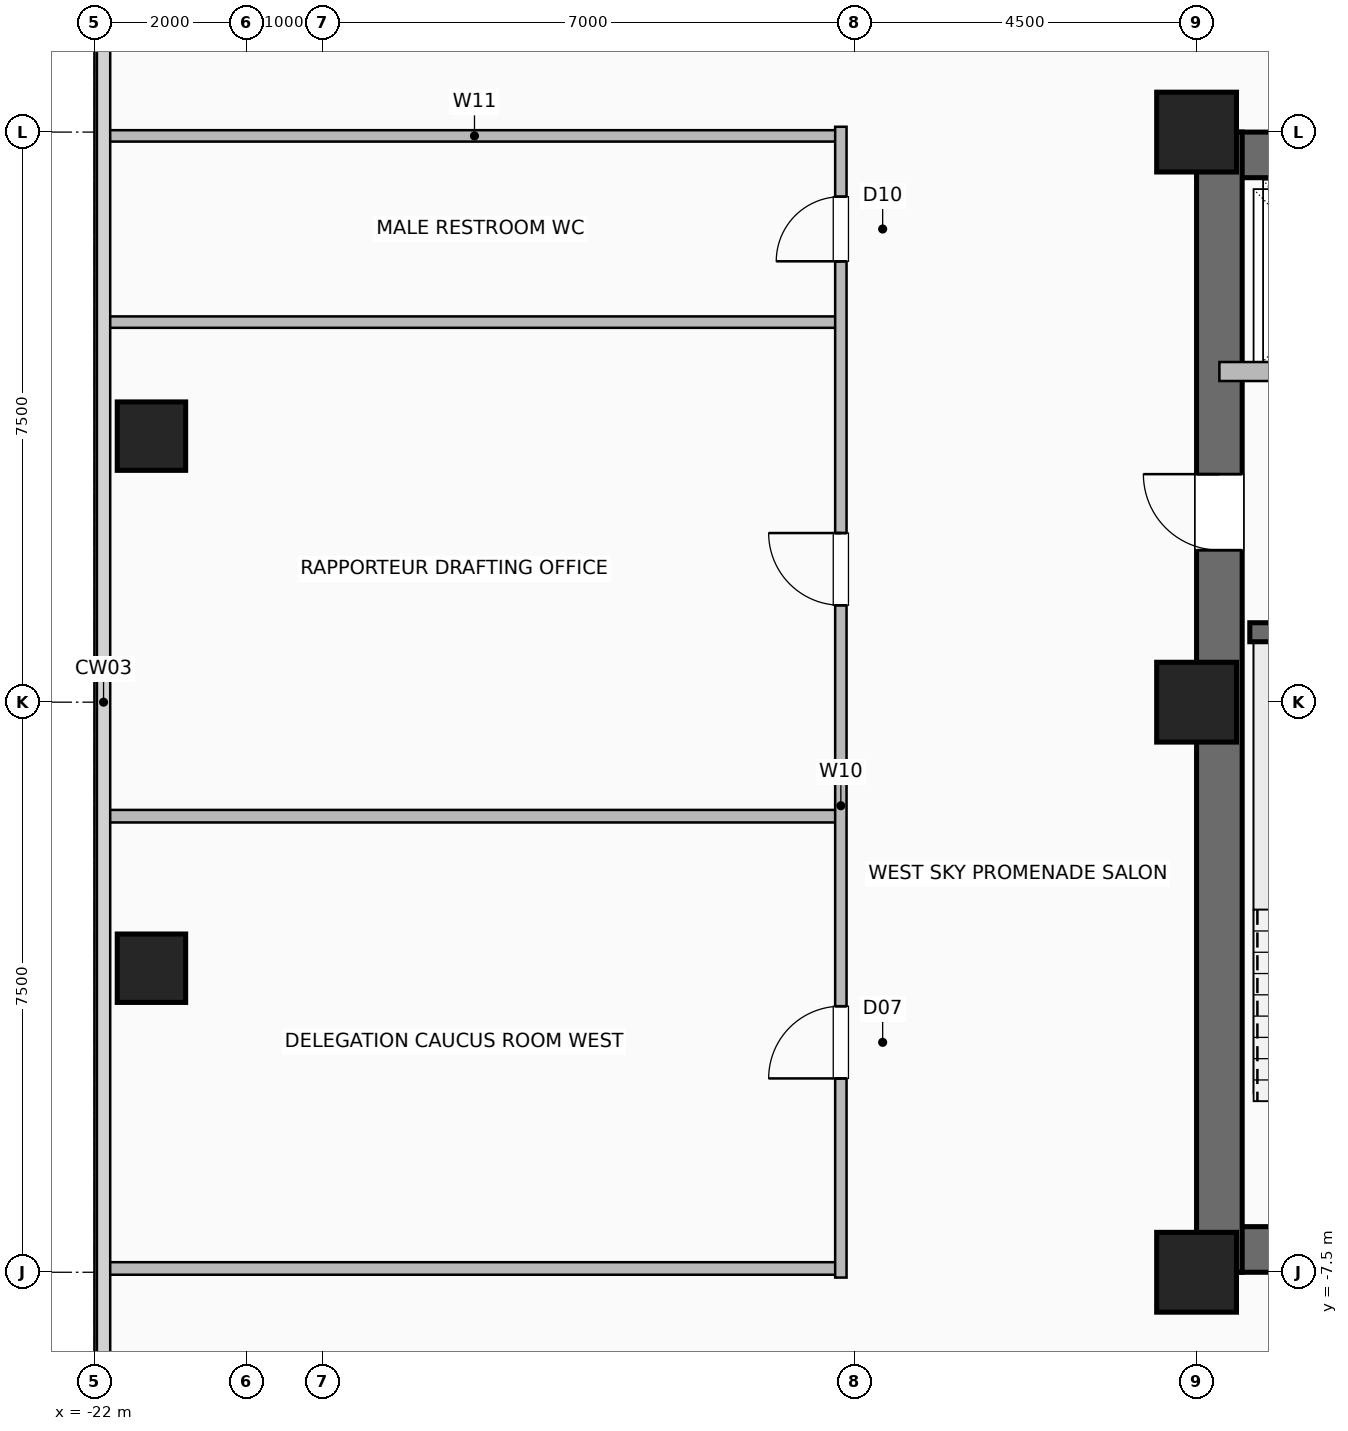
"""IFC4 building model, lengths in metres.
Left out: names, types, materials, properties, quantities, classifications, styles, units other than length and angle.
Written with IfcOpenShell. Run it as: python <this file> out.ifc"""

import sys

from ifc_helpers import new_model, si_unit, direction, frame, frame_2d, origin, origin_2d, place, context, subcontext, project, spatial, rectangle, hollow_rectangle, extrude, element, fill, save


model = new_model("IFC4")
c1 = context("Model", 3, precision=1e-05, world=origin(), true_north=direction((0.0, 1.0)))
c2 = subcontext(c1, "Body", "Model", "MODEL_VIEW")
j1 = project(units=[si_unit("LENGTHUNIT", "METRE"), si_unit("PLANEANGLEUNIT", "RADIAN")], contexts=[c1])
p1 = place(None, origin())
s1 = spatial("IfcSite", under=j1, at=p1, CompositionType="ELEMENT")
p2 = place(p1, origin())
s2 = spatial("IfcBuilding", under=s1, at=p2, CompositionType="ELEMENT")
p3 = place(p2, frame((0.0, 0.0, 101.2)))
s3 = spatial("IfcBuildingStorey", under=s2, at=p3, CompositionType="ELEMENT", Elevation=101.2)
for number, where, z_axis, x_axis in (
    (1, (-7.5, -7.5, 0.0), (0.0, 0.0, 1.0), (1.0, 0.0, 0.0)),
    (2, (-7.5, 7.5, 0.0), (0.0, 0.0, 1.0), (1.0, 0.0, 0.0)),
    (3, (-7.5, 0.0, 0.0), (0.0, 0.0, 1.0), (1.0, 0.0, 0.0)),
):
    element("IfcColumn", number, at=place(p3, frame(where, z_axis=z_axis, x_axis=x_axis)), inside=s3, PredefinedType="COLUMN", context=c2, shape_type="SweptSolid", body=[
        extrude(hollow_rectangle(XDim=1.05, YDim=1.05, WallThickness=0.05, at=origin_2d()), origin(), (0.0, 0.0, 1.0), 3.6),
    ])
for number, where, z_axis, x_axis in (
    (4, (-21.25, -3.5, 0.0), (0.0, 0.0, 1.0), (1.0, 0.0, 0.0)),
    (5, (-21.25, 3.5, 0.0), (0.0, 0.0, 1.0), (1.0, 0.0, 0.0)),
):
    element("IfcColumn", number, at=place(p3, frame(where, z_axis=z_axis, x_axis=x_axis)), inside=s3, PredefinedType="COLUMN", context=c2, shape_type="SweptSolid", body=[
        extrude(hollow_rectangle(XDim=0.9, YDim=0.9, WallThickness=0.045, at=origin_2d()), origin(), (0.0, 0.0, 1.0), 3.6),
    ])
p4 = place(p3, frame((-7.5, -7.2, 0.0), z_axis=(0.0, 0.0, 1.0), x_axis=(1.0, 0.0, 0.0)))
e6 = element("IfcWall", 6, at=p4, inside=s3, PredefinedType="SHEAR", context=c2, shape_type="SweptSolid", body=[
    extrude(rectangle(XDim=15.0, YDim=0.6, at=frame_2d((7.5, 0.0))), origin(), (0.0, 0.0, 1.0), 3.36),
])
p5 = place(p4, frame((1.55, 0.0, 0.0)))
e7 = element("IfcOpeningElement", 7, at=p5, cuts=e6, PredefinedType="OPENING", context=c2, shape_type="SweptSolid", body=[
    extrude(rectangle(XDim=1.05, YDim=2.08, at=frame_2d((0.525, 1.04))), frame((0.0, 0.31, 0.0), z_axis=(0.0, -1.0, 0.0), x_axis=(1.0, 0.0, 0.0)), (0.0, 0.0, 1.0), 0.62),
])
p6 = place(p4, frame((12.4, 0.0, 0.0)))
e8 = element("IfcOpeningElement", 8, at=p6, cuts=e6, PredefinedType="OPENING", context=c2, shape_type="SweptSolid", body=[
    extrude(rectangle(XDim=1.05, YDim=2.08, at=frame_2d((0.525, 1.04))), frame((0.0, 0.31, 0.0), z_axis=(0.0, -1.0, 0.0), x_axis=(1.0, 0.0, 0.0)), (0.0, 0.0, 1.0), 0.62),
])
p7 = place(p4, frame((4.95, 0.0, 0.0)))
e9 = element("IfcOpeningElement", 9, at=p7, cuts=e6, PredefinedType="OPENING", context=c2, shape_type="SweptSolid", body=[
    extrude(rectangle(XDim=1.0, YDim=2.08, at=frame_2d((0.5, 1.04))), frame((0.0, 0.31, 0.0), z_axis=(0.0, -1.0, 0.0), x_axis=(1.0, 0.0, 0.0)), (0.0, 0.0, 1.0), 0.62),
])
p8 = place(p4, frame((7.05, 0.0, 0.0)))
e10 = element("IfcOpeningElement", 10, at=p8, cuts=e6, PredefinedType="OPENING", context=c2, shape_type="SweptSolid", body=[
    extrude(rectangle(XDim=1.0, YDim=2.08, at=frame_2d((0.5, 1.04))), frame((0.0, 0.31, 0.0), z_axis=(0.0, -1.0, 0.0), x_axis=(1.0, 0.0, 0.0)), (0.0, 0.0, 1.0), 0.62),
])
p9 = place(p4, frame((9.15, 0.0, 0.0)))
e11 = element("IfcOpeningElement", 11, at=p9, cuts=e6, PredefinedType="OPENING", context=c2, shape_type="SweptSolid", body=[
    extrude(rectangle(XDim=1.0, YDim=2.08, at=frame_2d((0.5, 1.04))), frame((0.0, 0.31, 0.0), z_axis=(0.0, -1.0, 0.0), x_axis=(1.0, 0.0, 0.0)), (0.0, 0.0, 1.0), 0.62),
])
p10 = place(p3, frame((-7.5, 7.2, 0.0), z_axis=(0.0, 0.0, 1.0), x_axis=(1.0, 0.0, 0.0)))
e12 = element("IfcWall", 12, at=p10, inside=s3, PredefinedType="SHEAR", context=c2, shape_type="SweptSolid", body=[
    extrude(rectangle(XDim=15.0, YDim=0.6, at=frame_2d((7.5, 0.0))), origin(), (0.0, 0.0, 1.0), 3.36),
])
p11 = place(p3, frame((-7.2, -7.5, 0.0), z_axis=(0.0, 0.0, 1.0), x_axis=(0.0, 1.0, 0.0)))
e13 = element("IfcWall", 13, at=p11, inside=s3, PredefinedType="SHEAR", context=c2, shape_type="SweptSolid", body=[
    extrude(rectangle(XDim=15.0, YDim=0.6, at=frame_2d((7.5, 0.0))), origin(), (0.0, 0.0, 1.0), 3.36),
])
p12 = place(p11, frame((9.5, 0.0, 0.0)))
e14 = element("IfcOpeningElement", 14, at=p12, cuts=e13, PredefinedType="OPENING", context=c2, shape_type="SweptSolid", body=[
    extrude(rectangle(XDim=1.0, YDim=2.08, at=frame_2d((0.5, 1.04))), frame((0.0, 0.31, 0.0), z_axis=(0.0, -1.0, 0.0), x_axis=(1.0, 0.0, 0.0)), (0.0, 0.0, 1.0), 0.62),
])
p13 = place(p3, frame((-6.8, 0.92, 0.0), z_axis=(0.0, 0.0, 1.0), x_axis=(1.0, 0.0, 0.0)))
e15 = element("IfcWall", 15, at=p13, inside=s3, PredefinedType="SHEAR", context=c2, shape_type="SweptSolid", body=[
    extrude(rectangle(XDim=3.33, YDim=0.25, at=frame_2d((1.665, 0.0))), origin(), (0.0, 0.0, 1.0), 3.36),
])
p14 = place(p3, frame((-7.2, 4.35, 0.0), z_axis=(0.0, 0.0, 1.0), x_axis=(1.0, 0.0, 0.0)))
e16 = element("IfcWall", 16, at=p14, inside=s3, PredefinedType="SHEAR", context=c2, shape_type="SweptSolid", body=[
    extrude(rectangle(XDim=2.7, YDim=0.25, at=frame_2d((1.35, 0.0))), origin(), (0.0, 0.0, 1.0), 3.36),
])
p15 = place(p14, frame((0.75, 0.0, 0.0)))
e17 = element("IfcOpeningElement", 17, at=p15, cuts=e16, PredefinedType="OPENING", context=c2, shape_type="SweptSolid", body=[
    extrude(rectangle(XDim=1.2, YDim=2.2, at=frame_2d((0.6, 1.1))), frame((0.0, 0.135, 0.0), z_axis=(0.0, -1.0, 0.0), x_axis=(1.0, 0.0, 0.0)), (0.0, 0.0, 1.0), 0.27),
])
for number, where, z_axis, x_axis in (
    (18, (-21.82, -7.45, 0.0), (0.0, 0.0, 1.0), (1.0, 0.0, 0.0)),
    (19, (-21.82, -1.5, 0.0), (0.0, 0.0, 1.0), (1.0, 0.0, 0.0)),
):
    element("IfcWall", number, at=place(p3, frame(where, z_axis=z_axis, x_axis=x_axis)), inside=s3, PredefinedType="PLUMBINGWALL", context=c2, shape_type="SweptSolid", body=[
        extrude(rectangle(XDim=9.64, YDim=0.165, at=frame_2d((4.82, 0.0))), origin(), (0.0, 0.0, 1.0), 3.36),
    ])
for number, where, z_axis, x_axis in (
    (20, (-21.82, 5.0, 0.0), (0.0, 0.0, 1.0), (1.0, 0.0, 0.0)),
    (21, (-21.82, 7.45, 0.0), (0.0, 0.0, 1.0), (1.0, 0.0, 0.0)),
):
    element("IfcWall", number, at=place(p3, frame(where, z_axis=z_axis, x_axis=x_axis)), inside=s3, PredefinedType="PARTITIONING", context=c2, shape_type="SweptSolid", body=[
        extrude(rectangle(XDim=9.64, YDim=0.15, at=frame_2d((4.82, 0.0))), origin(), (0.0, 0.0, 1.0), 3.36),
    ])
p16 = place(p3, frame((-12.18, -7.57, 0.0), z_axis=(0.0, 0.0, 1.0), x_axis=(0.0, 1.0, 0.0)))
e22 = element("IfcWall", 22, at=p16, inside=s3, PredefinedType="PARTITIONING", context=c2, shape_type="SweptSolid", body=[
    extrude(rectangle(XDim=15.14, YDim=0.15, at=frame_2d((7.57, 0.0))), origin(), (0.0, 0.0, 1.0), 3.36),
])
p17 = place(p16, frame((2.62, 0.0, 0.0)))
e23 = element("IfcOpeningElement", 23, at=p17, cuts=e22, PredefinedType="OPENING", context=c2, shape_type="SweptSolid", body=[
    extrude(rectangle(XDim=0.95, YDim=2.06, at=frame_2d((0.475, 1.03))), frame((0.0, 0.085, 0.0), z_axis=(0.0, -1.0, 0.0), x_axis=(1.0, 0.0, 0.0)), (0.0, 0.0, 1.0), 0.17),
])
p18 = place(p16, frame((8.845, 0.0, 0.0)))
e24 = element("IfcOpeningElement", 24, at=p18, cuts=e22, PredefinedType="OPENING", context=c2, shape_type="SweptSolid", body=[
    extrude(rectangle(XDim=0.95, YDim=2.06, at=frame_2d((0.475, 1.03))), frame((0.0, 0.085, 0.0), z_axis=(0.0, -1.0, 0.0), x_axis=(1.0, 0.0, 0.0)), (0.0, 0.0, 1.0), 0.17),
])
p19 = place(p16, frame((13.37, 0.0, 0.0)))
e25 = element("IfcOpeningElement", 25, at=p19, cuts=e22, PredefinedType="OPENING", context=c2, shape_type="SweptSolid", body=[
    extrude(rectangle(XDim=0.85, YDim=2.05, at=frame_2d((0.425, 1.025))), frame((0.0, 0.085, 0.0), z_axis=(0.0, -1.0, 0.0), x_axis=(1.0, 0.0, 0.0)), (0.0, 0.0, 1.0), 0.17),
])
p20 = place(p12, origin())
e26 = element("IfcDoor", 26, at=p20, inside=s3, OperationType="SINGLE_SWING_RIGHT", PredefinedType="DOOR", context=c2, shape_type="SweptSolid", body=[
    extrude(rectangle(XDim=1.0, YDim=2.08, at=frame_2d((0.5, 1.04))), frame((0.0, 0.025, 0.0), z_axis=(0.0, -1.0, 0.0), x_axis=(1.0, 0.0, 0.0)), (0.0, 0.0, 1.0), 0.05),
])
fill(e14, e26)
p21 = place(p17, origin())
e27 = element("IfcDoor", 27, at=p21, inside=s3, OperationType="SINGLE_SWING_LEFT", PredefinedType="DOOR", context=c2, shape_type="SweptSolid", body=[
    extrude(rectangle(XDim=0.95, YDim=2.06, at=frame_2d((0.475, 1.03))), frame((0.0, 0.025, 0.0), z_axis=(0.0, -1.0, 0.0), x_axis=(1.0, 0.0, 0.0)), (0.0, 0.0, 1.0), 0.05),
])
fill(e23, e27)
p22 = place(p18, origin())
e28 = element("IfcDoor", 28, at=p22, inside=s3, OperationType="SINGLE_SWING_RIGHT", PredefinedType="DOOR", context=c2, shape_type="SweptSolid", body=[
    extrude(rectangle(XDim=0.95, YDim=2.06, at=frame_2d((0.475, 1.03))), frame((0.0, 0.025, 0.0), z_axis=(0.0, -1.0, 0.0), x_axis=(1.0, 0.0, 0.0)), (0.0, 0.0, 1.0), 0.05),
])
fill(e24, e28)
p23 = place(p19, origin())
e29 = element("IfcDoor", 29, at=p23, inside=s3, OperationType="SINGLE_SWING_LEFT", PredefinedType="DOOR", context=c2, shape_type="SweptSolid", body=[
    extrude(rectangle(XDim=0.85, YDim=2.05, at=frame_2d((0.425, 1.025))), frame((0.0, 0.025, 0.0), z_axis=(0.0, -1.0, 0.0), x_axis=(1.0, 0.0, 0.0)), (0.0, 0.0, 1.0), 0.05),
])
fill(e25, e29)
save(model, sys.argv[1])
